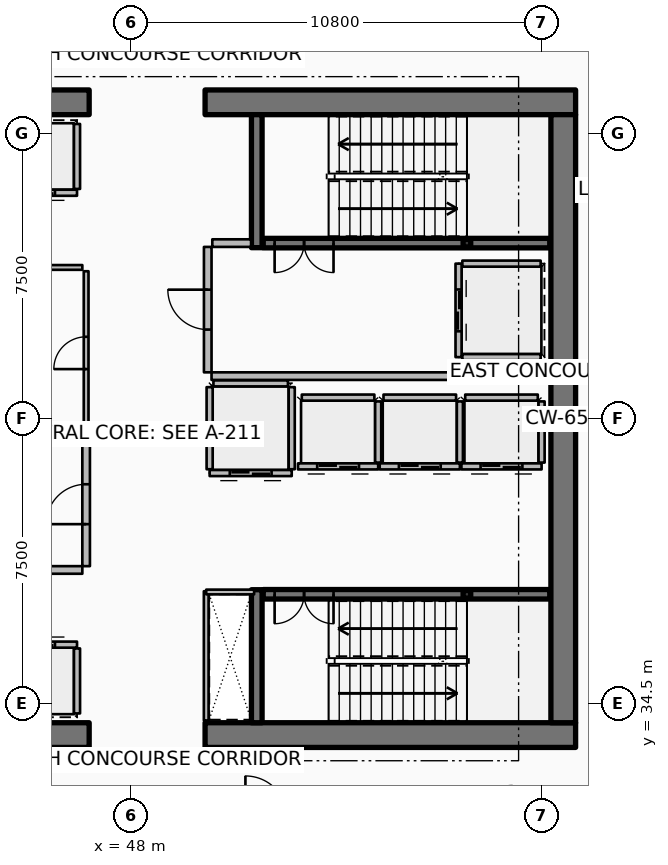
"""IFC4 building model, lengths in metres.
Left out: names, types, materials, properties, quantities, classifications, styles, units other than length and angle.
Written with IfcOpenShell. Run it as: python <this file> out.ifc"""

import sys

from ifc_helpers import new_model, si_unit, direction, frame, frame_2d, origin, origin_2d, place, context, subcontext, project, spatial, rectangle, hollow_rectangle, extrude, element, fill, save


model = new_model("IFC4")
c1 = context("Model", 3, precision=1e-05, world=origin(), true_north=direction((0.0, 1.0)))
c2 = subcontext(c1, "Body", "Model", "MODEL_VIEW")
j1 = project(units=[si_unit("LENGTHUNIT", "METRE"), si_unit("PLANEANGLEUNIT", "RADIAN")], contexts=[c1])
p1 = place(None, origin())
s1 = spatial("IfcSite", under=j1, at=p1, CompositionType="ELEMENT")
p2 = place(p1, origin())
s2 = spatial("IfcBuilding", under=s1, at=p2, CompositionType="ELEMENT")
p3 = place(p2, frame((0.0, 0.0, 231.9)))
s3 = spatial("IfcBuildingStorey", under=s2, at=p3, CompositionType="ELEMENT", Elevation=231.9)
for number, where, z_axis, x_axis in (
    (1, (37.15, 33.675, 0.0), (0.0, 0.0, 1.0), (1.0, 0.0, 0.0)),
    (2, (49.95, 33.675, 0.0), (0.0, 0.0, 1.0), (1.0, 0.0, 0.0)),
    (3, (37.15, 50.325, 0.0), (0.0, 0.0, 1.0), (1.0, 0.0, 0.0)),
    (4, (49.95, 50.325, 0.0), (0.0, 0.0, 1.0), (1.0, 0.0, 0.0)),
):
    element("IfcWall", number, at=place(p3, frame(where, z_axis=z_axis, x_axis=x_axis)), inside=s3, PredefinedType="SHEAR", context=c2, shape_type="SweptSolid", body=[
        extrude(rectangle(XDim=9.75, YDim=0.65, at=frame_2d((4.875, 0.0))), origin(), (0.0, 0.0, 1.0), 4.8),
    ])
p4 = place(p3, frame((59.375, 34.0, 0.0), z_axis=(0.0, 0.0, 1.0), x_axis=(0.0, 1.0, 0.0)))
e5 = element("IfcWall", 5, at=p4, inside=s3, PredefinedType="SHEAR", context=c2, shape_type="SweptSolid", body=[
    extrude(rectangle(XDim=16.0, YDim=0.65, at=frame_2d((8.0, 0.0))), origin(), (0.0, 0.0, 1.0), 4.8),
])
for number, where, z_axis, x_axis in (
    (6, (51.31, 46.5, 0.0), (0.0, 0.0, 1.0), (0.0, 1.0, 0.0)),
    (7, (51.31, 34.0, 0.0), (0.0, 0.0, 1.0), (0.0, 1.0, 0.0)),
):
    element("IfcWall", number, at=place(p3, frame(where, z_axis=z_axis, x_axis=x_axis)), inside=s3, PredefinedType="SHEAR", context=c2, shape_type="SweptSolid", body=[
        extrude(rectangle(XDim=3.5, YDim=0.28, at=frame_2d((1.75, 0.0))), origin(), (0.0, 0.0, 1.0), 4.8),
    ])
for number, where, z_axis, x_axis in (
    (8, (56.84, 46.62, 0.0), (0.0, 0.0, 1.0), (1.0, 0.0, 0.0)),
    (9, (56.84, 37.38, 0.0), (0.0, 0.0, 1.0), (1.0, 0.0, 0.0)),
):
    element("IfcColumn", number, at=place(p3, frame(where, z_axis=z_axis, x_axis=x_axis)), inside=s3, PredefinedType="COLUMN", context=c2, shape_type="SweptSolid", body=[
        extrude(hollow_rectangle(XDim=0.2, YDim=0.2, WallThickness=0.01, InnerFilletRadius=0.01, OuterFilletRadius=0.02, at=origin_2d()), origin(), (0.0, 0.0, 1.0), 2.195),
    ])
p5 = place(p3, frame((51.48, 46.62, 0.0), z_axis=(0.0, 0.0, 1.0), x_axis=(1.0, 0.0, 0.0)))
e10 = element("IfcWall", 10, at=p5, inside=s3, PredefinedType="SOLIDWALL", context=c2, shape_type="SweptSolid", body=[
    extrude(rectangle(XDim=7.54, YDim=0.25, at=frame_2d((3.77, 0.0))), origin(), (0.0, 0.0, 1.0), 4.4),
])
p6 = place(p5, frame((0.3, 0.0, 0.0)))
e11 = element("IfcOpeningElement", 11, at=p6, cuts=e10, PredefinedType="OPENING", context=c2, shape_type="SweptSolid", body=[
    extrude(rectangle(XDim=1.55, YDim=2.15, at=frame_2d((0.775, 1.075))), frame((0.0, 0.135, 0.0), z_axis=(0.0, -1.0, 0.0), x_axis=(1.0, 0.0, 0.0)), (0.0, 0.0, 1.0), 0.27),
])
p7 = place(p3, frame((51.48, 37.38, 0.0), z_axis=(0.0, 0.0, 1.0), x_axis=(1.0, 0.0, 0.0)))
e12 = element("IfcWall", 12, at=p7, inside=s3, PredefinedType="SOLIDWALL", context=c2, shape_type="SweptSolid", body=[
    extrude(rectangle(XDim=7.54, YDim=0.25, at=frame_2d((3.77, 0.0))), origin(), (0.0, 0.0, 1.0), 4.4),
])
p8 = place(p7, frame((0.3, 0.0, 0.0)))
e13 = element("IfcOpeningElement", 13, at=p8, cuts=e12, PredefinedType="OPENING", context=c2, shape_type="SweptSolid", body=[
    extrude(rectangle(XDim=1.55, YDim=2.15, at=frame_2d((0.775, 1.075))), frame((0.0, 0.135, 0.0), z_axis=(0.0, -1.0, 0.0), x_axis=(1.0, 0.0, 0.0)), (0.0, 0.0, 1.0), 0.27),
])
p9 = place(p3, frame((46.58, 47.945, 0.0), z_axis=(0.0, 0.0, 1.0), x_axis=(-1.0, 0.0, 0.0)))
e14 = element("IfcWall", 14, at=p9, inside=s3, PredefinedType="PARTITIONING", context=c2, shape_type="SweptSolid", body=[
    extrude(rectangle(XDim=2.26, YDim=0.16, at=frame_2d((1.13, 0.0))), origin(), (0.0, 0.0, 1.0), 4.4),
])
p10 = place(p9, frame((0.58, 0.0, 0.0)))
e15 = element("IfcOpeningElement", 15, at=p10, cuts=e14, PredefinedType="OPENING", context=c2, shape_type="SweptSolid", body=[
    extrude(rectangle(XDim=1.1, YDim=2.1, at=frame_2d((0.55, 1.05))), frame((0.0, 0.09, 0.0), z_axis=(0.0, -1.0, 0.0), x_axis=(1.0, 0.0, 0.0)), (0.0, 0.0, 1.0), 0.18),
])
p11 = place(p3, frame((46.58, 48.045, 0.0), z_axis=(0.0, 0.0, 1.0), x_axis=(0.0, 1.0, 0.0)))
e16 = element("IfcWall", 16, at=p11, inside=s3, PredefinedType="PARTITIONING", context=c2, shape_type="SweptSolid", body=[
    extrude(rectangle(XDim=1.71, YDim=0.16, at=frame_2d((0.855, 0.0))), origin(), (0.0, 0.0, 1.0), 4.4),
])
p12 = place(p3, frame((44.32, 36.055, 0.0), z_axis=(0.0, 0.0, 1.0), x_axis=(1.0, 0.0, 0.0)))
e17 = element("IfcWall", 17, at=p12, inside=s3, PredefinedType="PARTITIONING", context=c2, shape_type="SweptSolid", body=[
    extrude(rectangle(XDim=2.26, YDim=0.16, at=frame_2d((1.13, 0.0))), origin(), (0.0, 0.0, 1.0), 4.4),
])
p13 = place(p12, frame((0.58, 0.0, 0.0)))
e18 = element("IfcOpeningElement", 18, at=p13, cuts=e17, PredefinedType="OPENING", context=c2, shape_type="SweptSolid", body=[
    extrude(rectangle(XDim=1.1, YDim=2.1, at=frame_2d((0.55, 1.05))), frame((0.0, 0.09, 0.0), z_axis=(0.0, -1.0, 0.0), x_axis=(1.0, 0.0, 0.0)), (0.0, 0.0, 1.0), 0.18),
])
p14 = place(p3, frame((46.58, 34.245, 0.0), z_axis=(0.0, 0.0, 1.0), x_axis=(0.0, 1.0, 0.0)))
e19 = element("IfcWall", 19, at=p14, inside=s3, PredefinedType="PARTITIONING", context=c2, shape_type="SweptSolid", body=[
    extrude(rectangle(XDim=1.71, YDim=0.16, at=frame_2d((0.855, 0.0))), origin(), (0.0, 0.0, 1.0), 4.4),
])
p15 = place(p3, frame((54.505, 40.745, 0.0), z_axis=(0.0, 0.0, 1.0), x_axis=(-1.0, 0.0, 0.0)))
e20 = element("IfcWall", 20, at=p15, inside=s3, PredefinedType="PARTITIONING", context=c2, shape_type="SweptSolid", body=[
    extrude(rectangle(XDim=2.11, YDim=0.16, at=frame_2d((1.055, 0.0))), origin(), (0.0, 0.0, 1.0), 4.4),
])
p16 = place(p15, frame((0.505, 0.0, 0.0)))
e21 = element("IfcOpeningElement", 21, at=p16, cuts=e20, PredefinedType="OPENING", context=c2, shape_type="SweptSolid", body=[
    extrude(rectangle(XDim=1.1, YDim=2.1, at=frame_2d((0.55, 1.05))), frame((0.0, 0.09, 0.0), z_axis=(0.0, -1.0, 0.0), x_axis=(1.0, 0.0, 0.0)), (0.0, 0.0, 1.0), 0.18),
])
p17 = place(p3, frame((54.505, 40.845, 0.0), z_axis=(0.0, 0.0, 1.0), x_axis=(0.0, 1.0, 0.0)))
e22 = element("IfcWall", 22, at=p17, inside=s3, PredefinedType="PARTITIONING", context=c2, shape_type="SweptSolid", body=[
    extrude(rectangle(XDim=1.61, YDim=0.16, at=frame_2d((0.805, 0.0))), origin(), (0.0, 0.0, 1.0), 4.4),
])
p18 = place(p3, frame((52.495, 42.555, 0.0), z_axis=(0.0, 0.0, 1.0), x_axis=(1.0, 0.0, 0.0)))
e23 = element("IfcWall", 23, at=p18, inside=s3, PredefinedType="PARTITIONING", context=c2, shape_type="SweptSolid", body=[
    extrude(rectangle(XDim=1.91, YDim=0.16, at=frame_2d((0.955, 0.0))), origin(), (0.0, 0.0, 1.0), 4.4),
])
p19 = place(p3, frame((56.655, 40.745, 0.0), z_axis=(0.0, 0.0, 1.0), x_axis=(-1.0, 0.0, 0.0)))
e24 = element("IfcWall", 24, at=p19, inside=s3, PredefinedType="PARTITIONING", context=c2, shape_type="SweptSolid", body=[
    extrude(rectangle(XDim=2.11, YDim=0.16, at=frame_2d((1.055, 0.0))), origin(), (0.0, 0.0, 1.0), 4.4),
])
p20 = place(p19, frame((0.505, 0.0, 0.0)))
e25 = element("IfcOpeningElement", 25, at=p20, cuts=e24, PredefinedType="OPENING", context=c2, shape_type="SweptSolid", body=[
    extrude(rectangle(XDim=1.1, YDim=2.1, at=frame_2d((0.55, 1.05))), frame((0.0, 0.09, 0.0), z_axis=(0.0, -1.0, 0.0), x_axis=(1.0, 0.0, 0.0)), (0.0, 0.0, 1.0), 0.18),
])
p21 = place(p3, frame((56.655, 40.845, 0.0), z_axis=(0.0, 0.0, 1.0), x_axis=(0.0, 1.0, 0.0)))
e26 = element("IfcWall", 26, at=p21, inside=s3, PredefinedType="PARTITIONING", context=c2, shape_type="SweptSolid", body=[
    extrude(rectangle(XDim=1.61, YDim=0.16, at=frame_2d((0.805, 0.0))), origin(), (0.0, 0.0, 1.0), 4.4),
])
p22 = place(p3, frame((54.645, 42.555, 0.0), z_axis=(0.0, 0.0, 1.0), x_axis=(1.0, 0.0, 0.0)))
e27 = element("IfcWall", 27, at=p22, inside=s3, PredefinedType="PARTITIONING", context=c2, shape_type="SweptSolid", body=[
    extrude(rectangle(XDim=1.91, YDim=0.16, at=frame_2d((0.955, 0.0))), origin(), (0.0, 0.0, 1.0), 4.4),
])
p23 = place(p3, frame((58.805, 40.745, 0.0), z_axis=(0.0, 0.0, 1.0), x_axis=(-1.0, 0.0, 0.0)))
e28 = element("IfcWall", 28, at=p23, inside=s3, PredefinedType="PARTITIONING", context=c2, shape_type="SweptSolid", body=[
    extrude(rectangle(XDim=2.11, YDim=0.16, at=frame_2d((1.055, 0.0))), origin(), (0.0, 0.0, 1.0), 4.4),
])
p24 = place(p23, frame((0.505, 0.0, 0.0)))
e29 = element("IfcOpeningElement", 29, at=p24, cuts=e28, PredefinedType="OPENING", context=c2, shape_type="SweptSolid", body=[
    extrude(rectangle(XDim=1.1, YDim=2.1, at=frame_2d((0.55, 1.05))), frame((0.0, 0.09, 0.0), z_axis=(0.0, -1.0, 0.0), x_axis=(1.0, 0.0, 0.0)), (0.0, 0.0, 1.0), 0.18),
])
p25 = place(p3, frame((58.805, 40.845, 0.0), z_axis=(0.0, 0.0, 1.0), x_axis=(0.0, 1.0, 0.0)))
e30 = element("IfcWall", 30, at=p25, inside=s3, PredefinedType="PARTITIONING", context=c2, shape_type="SweptSolid", body=[
    extrude(rectangle(XDim=1.61, YDim=0.16, at=frame_2d((0.805, 0.0))), origin(), (0.0, 0.0, 1.0), 4.4),
])
p26 = place(p3, frame((56.795, 42.555, 0.0), z_axis=(0.0, 0.0, 1.0), x_axis=(1.0, 0.0, 0.0)))
e31 = element("IfcWall", 31, at=p26, inside=s3, PredefinedType="PARTITIONING", context=c2, shape_type="SweptSolid", body=[
    extrude(rectangle(XDim=1.91, YDim=0.16, at=frame_2d((0.955, 0.0))), origin(), (0.0, 0.0, 1.0), 4.4),
])
p27 = place(p3, frame((56.62, 46.08, 0.0), z_axis=(0.0, 0.0, 1.0), x_axis=(0.0, -1.0, 0.0)))
e32 = element("IfcWall", 32, at=p27, inside=s3, PredefinedType="PARTITIONING", context=c2, shape_type="SweptSolid", body=[
    extrude(rectangle(XDim=2.46, YDim=0.16, at=frame_2d((1.23, 0.0))), origin(), (0.0, 0.0, 1.0), 4.4),
])
p28 = place(p27, frame((0.68, 0.0, 0.0)))
e33 = element("IfcOpeningElement", 33, at=p28, cuts=e32, PredefinedType="OPENING", context=c2, shape_type="SweptSolid", body=[
    extrude(rectangle(XDim=1.1, YDim=2.1, at=frame_2d((0.55, 1.05))), frame((0.0, 0.09, 0.0), z_axis=(0.0, -1.0, 0.0), x_axis=(1.0, 0.0, 0.0)), (0.0, 0.0, 1.0), 0.18),
])
for number, where, z_axis, x_axis in (
    (34, (56.72, 46.08, 0.0), (0.0, 0.0, 1.0), (1.0, 0.0, 0.0)),
    (35, (56.72, 43.62, 0.0), (0.0, 0.0, 1.0), (1.0, 0.0, 0.0)),
):
    element("IfcWall", number, at=place(p3, frame(where, z_axis=z_axis, x_axis=x_axis)), inside=s3, PredefinedType="PARTITIONING", context=c2, shape_type="SweptSolid", body=[
        extrude(rectangle(XDim=2.06, YDim=0.16, at=frame_2d((1.03, 0.0))), origin(), (0.0, 0.0, 1.0), 4.4),
    ])
p29 = place(p3, frame((52.23, 40.57, 0.0), z_axis=(0.0, 0.0, 1.0), x_axis=(-1.0, 0.0, 0.0)))
e36 = element("IfcWall", 36, at=p29, inside=s3, PredefinedType="PARTITIONING", context=c2, shape_type="SweptSolid", body=[
    extrude(rectangle(XDim=2.16, YDim=0.16, at=frame_2d((1.08, 0.0))), origin(), (0.0, 0.0, 1.0), 4.4),
])
p30 = place(p29, frame((0.53, 0.0, 0.0)))
e37 = element("IfcOpeningElement", 37, at=p30, cuts=e36, PredefinedType="OPENING", context=c2, shape_type="SweptSolid", body=[
    extrude(rectangle(XDim=1.1, YDim=2.1, at=frame_2d((0.55, 1.05))), frame((0.0, 0.09, 0.0), z_axis=(0.0, -1.0, 0.0), x_axis=(1.0, 0.0, 0.0)), (0.0, 0.0, 1.0), 0.18),
])
for number, where, z_axis, x_axis in (
    (38, (52.23, 40.67, 0.0), (0.0, 0.0, 1.0), (0.0, 1.0, 0.0)),
    (39, (50.07, 40.67, 0.0), (0.0, 0.0, 1.0), (0.0, 1.0, 0.0)),
):
    element("IfcWall", number, at=place(p3, frame(where, z_axis=z_axis, x_axis=x_axis)), inside=s3, PredefinedType="PARTITIONING", context=c2, shape_type="SweptSolid", body=[
        extrude(rectangle(XDim=2.16, YDim=0.16, at=frame_2d((1.08, 0.0))), origin(), (0.0, 0.0, 1.0), 4.4),
    ])
p31 = place(p3, frame((50.17, 42.93, 0.0), z_axis=(0.0, 0.0, 1.0), x_axis=(1.0, 0.0, 0.0)))
e40 = element("IfcWall", 40, at=p31, inside=s3, PredefinedType="PARTITIONING", context=c2, shape_type="SweptSolid", body=[
    extrude(rectangle(XDim=1.96, YDim=0.16, at=frame_2d((0.98, 0.0))), origin(), (0.0, 0.0, 1.0), 4.4),
])
p32 = place(p3, frame((41.35, 38.02, 0.0), z_axis=(0.0, 0.0, 1.0), x_axis=(1.0, 0.0, 0.0)))
e41 = element("IfcWall", 41, at=p32, inside=s3, PredefinedType="PARTITIONING", context=c2, shape_type="SweptSolid", body=[
    extrude(rectangle(XDim=5.37, YDim=0.2, at=frame_2d((2.685, 0.0))), origin(), (0.0, 0.0, 1.0), 4.4),
])
p33 = place(p3, frame((43.92, 41.48, 0.0), z_axis=(0.0, 0.0, 1.0), x_axis=(1.0, 0.0, 0.0)))
e42 = element("IfcWall", 42, at=p33, inside=s3, PredefinedType="PARTITIONING", context=c2, shape_type="SweptSolid", body=[
    extrude(rectangle(XDim=2.8, YDim=0.2, at=frame_2d((1.4, 0.0))), origin(), (0.0, 0.0, 1.0), 4.4),
])
p34 = place(p3, frame((46.82, 38.12, 0.0), z_axis=(0.0, 0.0, 1.0), x_axis=(0.0, 1.0, 0.0)))
e43 = element("IfcWall", 43, at=p34, inside=s3, PredefinedType="PARTITIONING", context=c2, shape_type="SweptSolid", body=[
    extrude(rectangle(XDim=3.26, YDim=0.2, at=frame_2d((1.63, 0.0))), origin(), (0.0, 0.0, 1.0), 4.4),
])
p35 = place(p34, frame((1.105, 0.0, 0.0)))
e44 = element("IfcOpeningElement", 44, at=p35, cuts=e43, PredefinedType="OPENING", context=c2, shape_type="SweptSolid", body=[
    extrude(rectangle(XDim=1.05, YDim=2.1, at=frame_2d((0.525, 1.05))), frame((0.0, 0.11, 0.0), z_axis=(0.0, -1.0, 0.0), x_axis=(1.0, 0.0, 0.0)), (0.0, 0.0, 1.0), 0.22),
])
p36 = place(p3, frame((50.12, 43.12, 0.0), z_axis=(0.0, 0.0, 1.0), x_axis=(1.0, 0.0, 0.0)))
e45 = element("IfcWall", 45, at=p36, inside=s3, PredefinedType="PARTITIONING", context=c2, shape_type="SweptSolid", body=[
    extrude(rectangle(XDim=8.88, YDim=0.2, at=frame_2d((4.44, 0.0))), origin(), (0.0, 0.0, 1.0), 4.4),
])
p37 = place(p3, frame((50.14, 46.62, 0.0), z_axis=(0.0, 0.0, 1.0), x_axis=(1.0, 0.0, 0.0)))
e46 = element("IfcWall", 46, at=p37, inside=s3, PredefinedType="PARTITIONING", context=c2, shape_type="SweptSolid", body=[
    extrude(rectangle(XDim=1.02, YDim=0.2, at=frame_2d((0.51, 0.0))), origin(), (0.0, 0.0, 1.0), 4.4),
])
p38 = place(p3, frame((50.02, 43.22, 0.0), z_axis=(0.0, 0.0, 1.0), x_axis=(0.0, 1.0, 0.0)))
e47 = element("IfcWall", 47, at=p38, inside=s3, PredefinedType="PARTITIONING", context=c2, shape_type="SweptSolid", body=[
    extrude(rectangle(XDim=3.3, YDim=0.2, at=frame_2d((1.65, 0.0))), origin(), (0.0, 0.0, 1.0), 4.4),
])
p39 = place(p38, frame((1.125, 0.0, 0.0)))
e48 = element("IfcOpeningElement", 48, at=p39, cuts=e47, PredefinedType="OPENING", context=c2, shape_type="SweptSolid", body=[
    extrude(rectangle(XDim=1.05, YDim=2.1, at=frame_2d((0.525, 1.05))), frame((0.0, 0.11, 0.0), z_axis=(0.0, -1.0, 0.0), x_axis=(1.0, 0.0, 0.0)), (0.0, 0.0, 1.0), 0.22),
])
p40 = place(p3, frame((41.36, 45.98, 0.0), z_axis=(0.0, 0.0, 1.0), x_axis=(1.0, 0.0, 0.0)))
e49 = element("IfcWall", 49, at=p40, inside=s3, PredefinedType="PARTITIONING", context=c2, shape_type="SweptSolid", body=[
    extrude(rectangle(XDim=5.36, YDim=0.125, at=frame_2d((2.68, 0.0))), origin(), (0.0, 0.0, 1.0), 3.84),
])
p41 = place(p3, frame((49.98, 34.06, 0.0), z_axis=(0.0, 0.0, 1.0), x_axis=(0.0, 1.0, 0.0)))
e50 = element("IfcWall", 50, at=p41, inside=s3, PredefinedType="PARTITIONING", context=c2, shape_type="SweptSolid", body=[
    extrude(rectangle(XDim=3.4, YDim=0.125, at=frame_2d((1.7, 0.0))), origin(), (0.0, 0.0, 1.0), 3.84),
])
p42 = place(p3, frame((49.98, 37.44, 0.0), z_axis=(0.0, 0.0, 1.0), x_axis=(1.0, 0.0, 0.0)))
e51 = element("IfcWall", 51, at=p42, inside=s3, PredefinedType="PARTITIONING", context=c2, shape_type="SweptSolid", body=[
    extrude(rectangle(XDim=1.26, YDim=0.125, at=frame_2d((0.63, 0.0))), origin(), (0.0, 0.0, 1.0), 3.84),
])
p43 = place(p3, frame((46.82, 41.58, 0.0), z_axis=(0.0, 0.0, 1.0), x_axis=(0.0, 1.0, 0.0)))
e52 = element("IfcWall", 52, at=p43, inside=s3, PredefinedType="PARTITIONING", context=c2, shape_type="SweptSolid", body=[
    extrude(rectangle(XDim=4.3, YDim=0.125, at=frame_2d((2.15, 0.0))), origin(), (0.0, 0.0, 1.0), 3.84),
])
p44 = place(p43, frame((1.725, 0.0, 0.0)))
e53 = element("IfcOpeningElement", 53, at=p44, cuts=e52, PredefinedType="OPENING", context=c2, shape_type="SweptSolid", body=[
    extrude(rectangle(XDim=0.85, YDim=2.06, at=frame_2d((0.425, 1.03))), frame((0.0, 0.073, 0.0), z_axis=(0.0, -1.0, 0.0), x_axis=(1.0, 0.0, 0.0)), (0.0, 0.0, 1.0), 0.145),
])
p45 = place(p6, origin())
e54 = element("IfcDoor", 54, at=p45, inside=s3, OperationType="DOUBLE_DOOR_SINGLE_SWING", PredefinedType="DOOR", context=c2, shape_type="SweptSolid", body=[
    extrude(rectangle(XDim=1.55, YDim=2.15, at=frame_2d((0.775, 1.075))), frame((0.0, 0.025, 0.0), z_axis=(0.0, -1.0, 0.0), x_axis=(1.0, 0.0, 0.0)), (0.0, 0.0, 1.0), 0.05),
])
fill(e11, e54)
p46 = place(p8, origin())
e55 = element("IfcDoor", 55, at=p46, inside=s3, OperationType="DOUBLE_DOOR_SINGLE_SWING", PredefinedType="DOOR", context=c2, shape_type="SweptSolid", body=[
    extrude(rectangle(XDim=1.55, YDim=2.15, at=frame_2d((0.775, 1.075))), frame((0.0, 0.025, 0.0), z_axis=(0.0, -1.0, 0.0), x_axis=(1.0, 0.0, 0.0)), (0.0, 0.0, 1.0), 0.05),
])
fill(e13, e55)
p47 = place(p10, origin())
e56 = element("IfcDoor", 56, at=p47, inside=s3, OperationType="DOUBLE_DOOR_SLIDING", PredefinedType="DOOR", context=c2, shape_type="SweptSolid", body=[
    extrude(rectangle(XDim=1.1, YDim=2.1, at=frame_2d((0.55, 1.05))), frame((0.0, 0.025, 0.0), z_axis=(0.0, -1.0, 0.0), x_axis=(1.0, 0.0, 0.0)), (0.0, 0.0, 1.0), 0.05),
])
fill(e15, e56)
p48 = place(p13, origin())
e57 = element("IfcDoor", 57, at=p48, inside=s3, OperationType="DOUBLE_DOOR_SLIDING", PredefinedType="DOOR", context=c2, shape_type="SweptSolid", body=[
    extrude(rectangle(XDim=1.1, YDim=2.1, at=frame_2d((0.55, 1.05))), frame((0.0, 0.025, 0.0), z_axis=(0.0, -1.0, 0.0), x_axis=(1.0, 0.0, 0.0)), (0.0, 0.0, 1.0), 0.05),
])
fill(e18, e57)
p49 = place(p16, origin())
e58 = element("IfcDoor", 58, at=p49, inside=s3, OperationType="DOUBLE_DOOR_SLIDING", PredefinedType="DOOR", context=c2, shape_type="SweptSolid", body=[
    extrude(rectangle(XDim=1.1, YDim=2.1, at=frame_2d((0.55, 1.05))), frame((0.0, 0.025, 0.0), z_axis=(0.0, -1.0, 0.0), x_axis=(1.0, 0.0, 0.0)), (0.0, 0.0, 1.0), 0.05),
])
fill(e21, e58)
p50 = place(p20, origin())
e59 = element("IfcDoor", 59, at=p50, inside=s3, OperationType="DOUBLE_DOOR_SLIDING", PredefinedType="DOOR", context=c2, shape_type="SweptSolid", body=[
    extrude(rectangle(XDim=1.1, YDim=2.1, at=frame_2d((0.55, 1.05))), frame((0.0, 0.025, 0.0), z_axis=(0.0, -1.0, 0.0), x_axis=(1.0, 0.0, 0.0)), (0.0, 0.0, 1.0), 0.05),
])
fill(e25, e59)
p51 = place(p24, origin())
e60 = element("IfcDoor", 60, at=p51, inside=s3, OperationType="DOUBLE_DOOR_SLIDING", PredefinedType="DOOR", context=c2, shape_type="SweptSolid", body=[
    extrude(rectangle(XDim=1.1, YDim=2.1, at=frame_2d((0.55, 1.05))), frame((0.0, 0.025, 0.0), z_axis=(0.0, -1.0, 0.0), x_axis=(1.0, 0.0, 0.0)), (0.0, 0.0, 1.0), 0.05),
])
fill(e29, e60)
p52 = place(p28, origin())
e61 = element("IfcDoor", 61, at=p52, inside=s3, OperationType="DOUBLE_DOOR_SLIDING", PredefinedType="DOOR", context=c2, shape_type="SweptSolid", body=[
    extrude(rectangle(XDim=1.1, YDim=2.1, at=frame_2d((0.55, 1.05))), frame((0.0, 0.025, 0.0), z_axis=(0.0, -1.0, 0.0), x_axis=(1.0, 0.0, 0.0)), (0.0, 0.0, 1.0), 0.05),
])
fill(e33, e61)
p53 = place(p30, origin())
e62 = element("IfcDoor", 62, at=p53, inside=s3, OperationType="DOUBLE_DOOR_SLIDING", PredefinedType="DOOR", context=c2, shape_type="SweptSolid", body=[
    extrude(rectangle(XDim=1.1, YDim=2.1, at=frame_2d((0.55, 1.05))), frame((0.0, 0.025, 0.0), z_axis=(0.0, -1.0, 0.0), x_axis=(1.0, 0.0, 0.0)), (0.0, 0.0, 1.0), 0.05),
])
fill(e37, e62)
p54 = place(p35, origin())
e63 = element("IfcDoor", 63, at=p54, inside=s3, OperationType="SINGLE_SWING_LEFT", PredefinedType="DOOR", context=c2, shape_type="SweptSolid", body=[
    extrude(rectangle(XDim=1.05, YDim=2.1, at=frame_2d((0.525, 1.05))), frame((0.0, 0.025, 0.0), z_axis=(0.0, -1.0, 0.0), x_axis=(1.0, 0.0, 0.0)), (0.0, 0.0, 1.0), 0.05),
])
fill(e44, e63)
p55 = place(p39, origin())
e64 = element("IfcDoor", 64, at=p55, inside=s3, OperationType="SINGLE_SWING_RIGHT", PredefinedType="DOOR", context=c2, shape_type="SweptSolid", body=[
    extrude(rectangle(XDim=1.05, YDim=2.1, at=frame_2d((0.525, 1.05))), frame((0.0, 0.025, 0.0), z_axis=(0.0, -1.0, 0.0), x_axis=(1.0, 0.0, 0.0)), (0.0, 0.0, 1.0), 0.05),
])
fill(e48, e64)
p56 = place(p44, origin())
e65 = element("IfcDoor", 65, at=p56, inside=s3, OperationType="SINGLE_SWING_LEFT", PredefinedType="DOOR", context=c2, shape_type="SweptSolid", body=[
    extrude(rectangle(XDim=0.85, YDim=2.06, at=frame_2d((0.425, 1.03))), frame((0.0, 0.025, 0.0), z_axis=(0.0, -1.0, 0.0), x_axis=(1.0, 0.0, 0.0)), (0.0, 0.0, 1.0), 0.05),
])
fill(e53, e65)
save(model, sys.argv[1])
